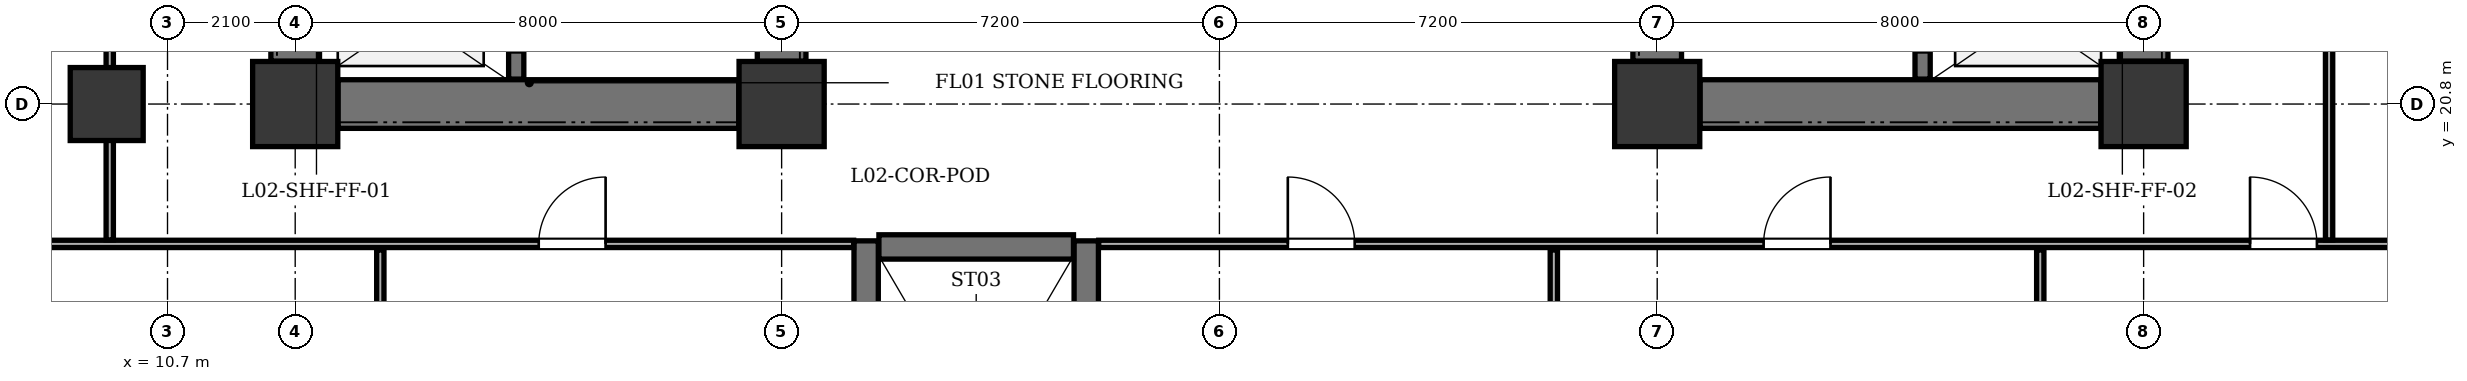
"""IFC4 building model, lengths in metres.
Left out: names, types, materials, properties, quantities, classifications, styles, units other than length and angle.
Written with IfcOpenShell. Run it as: python <this file> out.ifc"""

import sys

from ifc_helpers import new_model, si_unit, direction, frame, frame_2d, origin, origin_2d, place, context, subcontext, project, spatial, rectangle, extrude, element, fill, save


model = new_model("IFC4")
c1 = context("Model", 3, precision=1e-05, world=origin(), true_north=direction((0.0, 1.0)))
c2 = subcontext(c1, "Body", "Model", "MODEL_VIEW")
j1 = project(units=[si_unit("LENGTHUNIT", "METRE"), si_unit("PLANEANGLEUNIT", "RADIAN")], contexts=[c1])
p1 = place(None, origin())
s1 = spatial("IfcSite", under=j1, at=p1, CompositionType="ELEMENT")
p2 = place(p1, origin())
s2 = spatial("IfcBuilding", under=s1, at=p2, CompositionType="ELEMENT")
p3 = place(p2, frame((0.0, 0.0, 9.9)))
s3 = spatial("IfcBuildingStorey", under=s2, at=p3, CompositionType="ELEMENT", Elevation=9.9)
for number, where, z_axis, x_axis in (
    (1, (12.8, 20.8, 0.0), (0.0, 0.0, 1.0), (1.0, 0.0, 0.0)),
    (2, (20.8, 20.8, 0.0), (0.0, 0.0, 1.0), (1.0, 0.0, 0.0)),
    (3, (35.2, 20.8, 0.0), (0.0, 0.0, 1.0), (1.0, 0.0, 0.0)),
    (4, (43.2, 20.8, 0.0), (0.0, 0.0, 1.0), (1.0, 0.0, 0.0)),
):
    element("IfcColumn", number, at=place(p3, frame(where, z_axis=z_axis, x_axis=x_axis)), inside=s3, PredefinedType="COLUMN", context=c2, shape_type="SweptSolid", body=[
        extrude(rectangle(XDim=1.4, YDim=1.4, at=origin_2d()), origin(), (0.0, 0.0, 1.0), 4.5),
    ])
p4 = place(p3, frame((9.7, 20.8, 0.0), z_axis=(0.0, 0.0, 1.0), x_axis=(1.0, 0.0, 0.0)))
e5 = element("IfcColumn", 5, at=p4, inside=s3, PredefinedType="COLUMN", context=c2, shape_type="SweptSolid", body=[
    extrude(rectangle(XDim=1.2, YDim=1.2, at=origin_2d()), origin(), (0.0, 0.0, 1.0), 4.5),
])
p5 = place(p3, frame((12.8, 21.505, 0.0), z_axis=(0.0, 0.0, 1.0), x_axis=(0.0, 1.0, 0.0)))
e6 = element("IfcWall", 6, at=p5, inside=s3, PredefinedType="SHEAR", context=c2, shape_type="SweptSolid", body=[
    extrude(rectangle(XDim=11.39, YDim=0.8, at=frame_2d((5.695, 0.0))), origin(), (0.0, 0.0, 1.0), 4.18),
])
p6 = place(p3, frame((13.505, 20.8, 0.0), z_axis=(0.0, 0.0, 1.0), x_axis=(1.0, 0.0, 0.0)))
e7 = element("IfcWall", 7, at=p6, inside=s3, PredefinedType="SHEAR", context=c2, shape_type="SweptSolid", body=[
    extrude(rectangle(XDim=6.59, YDim=0.8, at=frame_2d((3.295, 0.0))), origin(), (0.0, 0.0, 1.0), 4.18),
])
p7 = place(p3, frame((20.8, 21.505, 0.0), z_axis=(0.0, 0.0, 1.0), x_axis=(0.0, 1.0, 0.0)))
e8 = element("IfcWall", 8, at=p7, inside=s3, PredefinedType="SHEAR", context=c2, shape_type="SweptSolid", body=[
    extrude(rectangle(XDim=11.39, YDim=0.8, at=frame_2d((5.695, 0.0))), origin(), (0.0, 0.0, 1.0), 4.18),
])
p8 = place(p7, frame((1.095, 0.0, 0.0)))
e9 = element("IfcOpeningElement", 9, at=p8, cuts=e8, PredefinedType="OPENING", context=c2, shape_type="SweptSolid", body=[
    extrude(rectangle(XDim=1.2, YDim=2.15, at=frame_2d((0.6, 1.075))), frame((0.0, 0.41, 0.0), z_axis=(0.0, -1.0, 0.0), x_axis=(1.0, 0.0, 0.0)), (0.0, 0.0, 1.0), 0.82),
])
p9 = place(p7, frame((4.095, 0.0, 0.0)))
e10 = element("IfcOpeningElement", 10, at=p9, cuts=e8, PredefinedType="OPENING", context=c2, shape_type="SweptSolid", body=[
    extrude(rectangle(XDim=1.1, YDim=2.1, at=frame_2d((0.55, 1.05))), frame((0.0, 0.41, 0.0), z_axis=(0.0, -1.0, 0.0), x_axis=(1.0, 0.0, 0.0)), (0.0, 0.0, 1.0), 0.82),
])
p10 = place(p7, frame((6.045, 0.0, 0.0)))
e11 = element("IfcOpeningElement", 11, at=p10, cuts=e8, PredefinedType="OPENING", context=c2, shape_type="SweptSolid", body=[
    extrude(rectangle(XDim=1.1, YDim=2.1, at=frame_2d((0.55, 1.05))), frame((0.0, 0.41, 0.0), z_axis=(0.0, -1.0, 0.0), x_axis=(1.0, 0.0, 0.0)), (0.0, 0.0, 1.0), 0.82),
])
p11 = place(p7, frame((7.995, 0.0, 0.0)))
e12 = element("IfcOpeningElement", 12, at=p11, cuts=e8, PredefinedType="OPENING", context=c2, shape_type="SweptSolid", body=[
    extrude(rectangle(XDim=1.1, YDim=2.1, at=frame_2d((0.55, 1.05))), frame((0.0, 0.41, 0.0), z_axis=(0.0, -1.0, 0.0), x_axis=(1.0, 0.0, 0.0)), (0.0, 0.0, 1.0), 0.82),
])
p12 = place(p7, frame((10.195, 0.0, 0.0)))
e13 = element("IfcOpeningElement", 13, at=p12, cuts=e8, PredefinedType="OPENING", context=c2, shape_type="SweptSolid", body=[
    extrude(rectangle(XDim=1.1, YDim=2.1, at=frame_2d((0.55, 1.05))), frame((0.0, 0.41, 0.0), z_axis=(0.0, -1.0, 0.0), x_axis=(1.0, 0.0, 0.0)), (0.0, 0.0, 1.0), 0.82),
])
p13 = place(p3, frame((16.435, 21.21, 0.0), z_axis=(0.0, 0.0, 1.0), x_axis=(0.0, 1.0, 0.0)))
e14 = element("IfcWall", 14, at=p13, inside=s3, PredefinedType="SHEAR", context=c2, shape_type="SweptSolid", body=[
    extrude(rectangle(XDim=11.98, YDim=0.25, at=frame_2d((5.99, 0.0))), origin(), (0.0, 0.0, 1.0), 4.18),
])
p14 = place(p13, frame((0.44, 0.0, 0.0)))
e15 = element("IfcOpeningElement", 15, at=p14, cuts=e14, PredefinedType="OPENING", context=c2, shape_type="SweptSolid", body=[
    extrude(rectangle(XDim=1.2, YDim=2.15, at=frame_2d((0.6, 1.075))), frame((0.0, 0.135, 0.0), z_axis=(0.0, -1.0, 0.0), x_axis=(1.0, 0.0, 0.0)), (0.0, 0.0, 1.0), 0.27),
])
p15 = place(p13, frame((2.59, 0.0, 0.0)))
e16 = element("IfcOpeningElement", 16, at=p15, cuts=e14, PredefinedType="OPENING", context=c2, shape_type="SweptSolid", body=[
    extrude(rectangle(XDim=1.15, YDim=2.15, at=frame_2d((0.575, 1.075))), frame((0.0, 0.135, 0.0), z_axis=(0.0, -1.0, 0.0), x_axis=(1.0, 0.0, 0.0)), (0.0, 0.0, 1.0), 0.27),
])
p16 = place(p3, frame((43.2, 21.505, 0.0), z_axis=(0.0, 0.0, 1.0), x_axis=(0.0, 1.0, 0.0)))
e17 = element("IfcWall", 17, at=p16, inside=s3, PredefinedType="SHEAR", context=c2, shape_type="SweptSolid", body=[
    extrude(rectangle(XDim=11.39, YDim=0.8, at=frame_2d((5.695, 0.0))), origin(), (0.0, 0.0, 1.0), 4.18),
])
p17 = place(p3, frame((35.905, 20.8, 0.0), z_axis=(0.0, 0.0, 1.0), x_axis=(1.0, 0.0, 0.0)))
e18 = element("IfcWall", 18, at=p17, inside=s3, PredefinedType="SHEAR", context=c2, shape_type="SweptSolid", body=[
    extrude(rectangle(XDim=6.59, YDim=0.8, at=frame_2d((3.295, 0.0))), origin(), (0.0, 0.0, 1.0), 4.18),
])
p18 = place(p3, frame((35.2, 21.505, 0.0), z_axis=(0.0, 0.0, 1.0), x_axis=(0.0, 1.0, 0.0)))
e19 = element("IfcWall", 19, at=p18, inside=s3, PredefinedType="SHEAR", context=c2, shape_type="SweptSolid", body=[
    extrude(rectangle(XDim=11.39, YDim=0.8, at=frame_2d((5.695, 0.0))), origin(), (0.0, 0.0, 1.0), 4.18),
])
p19 = place(p18, frame((1.095, 0.0, 0.0)))
e20 = element("IfcOpeningElement", 20, at=p19, cuts=e19, PredefinedType="OPENING", context=c2, shape_type="SweptSolid", body=[
    extrude(rectangle(XDim=1.2, YDim=2.15, at=frame_2d((0.6, 1.075))), frame((0.0, 0.41, 0.0), z_axis=(0.0, -1.0, 0.0), x_axis=(1.0, 0.0, 0.0)), (0.0, 0.0, 1.0), 0.82),
])
p20 = place(p18, frame((10.195, 0.0, 0.0)))
e21 = element("IfcOpeningElement", 21, at=p20, cuts=e19, PredefinedType="OPENING", context=c2, shape_type="SweptSolid", body=[
    extrude(rectangle(XDim=1.1, YDim=2.1, at=frame_2d((0.55, 1.05))), frame((0.0, 0.41, 0.0), z_axis=(0.0, -1.0, 0.0), x_axis=(1.0, 0.0, 0.0)), (0.0, 0.0, 1.0), 0.82),
])
p21 = place(p3, frame((39.565, 21.21, 0.0), z_axis=(0.0, 0.0, 1.0), x_axis=(0.0, 1.0, 0.0)))
e22 = element("IfcWall", 22, at=p21, inside=s3, PredefinedType="SHEAR", context=c2, shape_type="SweptSolid", body=[
    extrude(rectangle(XDim=11.98, YDim=0.25, at=frame_2d((5.99, 0.0))), origin(), (0.0, 0.0, 1.0), 4.18),
])
p22 = place(p21, frame((0.44, 0.0, 0.0)))
e23 = element("IfcOpeningElement", 23, at=p22, cuts=e22, PredefinedType="OPENING", context=c2, shape_type="SweptSolid", body=[
    extrude(rectangle(XDim=1.2, YDim=2.15, at=frame_2d((0.6, 1.075))), frame((0.0, 0.135, 0.0), z_axis=(0.0, -1.0, 0.0), x_axis=(1.0, 0.0, 0.0)), (0.0, 0.0, 1.0), 0.27),
])
p23 = place(p21, frame((2.59, 0.0, 0.0)))
e24 = element("IfcOpeningElement", 24, at=p23, cuts=e22, PredefinedType="OPENING", context=c2, shape_type="SweptSolid", body=[
    extrude(rectangle(XDim=1.15, YDim=2.15, at=frame_2d((0.575, 1.075))), frame((0.0, 0.135, 0.0), z_axis=(0.0, -1.0, 0.0), x_axis=(1.0, 0.0, 0.0)), (0.0, 0.0, 1.0), 0.27),
])
p24 = place(p3, frame((22.19, 10.95, 0.0), z_axis=(0.0, 0.0, 1.0), x_axis=(0.0, 1.0, 0.0)))
e25 = element("IfcWall", 25, at=p24, inside=s3, PredefinedType="SHEAR", context=c2, shape_type="SweptSolid", body=[
    extrude(rectangle(XDim=7.6, YDim=0.4, at=frame_2d((3.8, 0.0))), origin(), (0.0, 0.0, 1.0), 4.18),
])
p25 = place(p24, frame((0.35, 0.0, 0.0)))
e26 = element("IfcOpeningElement", 26, at=p25, cuts=e25, PredefinedType="OPENING", context=c2, shape_type="SweptSolid", body=[
    extrude(rectangle(XDim=1.15, YDim=2.15, at=frame_2d((0.575, 1.075))), frame((0.0, 0.21, 0.0), z_axis=(0.0, -1.0, 0.0), x_axis=(1.0, 0.0, 0.0)), (0.0, 0.0, 1.0), 0.42),
])
p26 = place(p3, frame((25.81, 10.95, 0.0), z_axis=(0.0, 0.0, 1.0), x_axis=(0.0, 1.0, 0.0)))
e27 = element("IfcWall", 27, at=p26, inside=s3, PredefinedType="SHEAR", context=c2, shape_type="SweptSolid", body=[
    extrude(rectangle(XDim=7.6, YDim=0.4, at=frame_2d((3.8, 0.0))), origin(), (0.0, 0.0, 1.0), 4.18),
])
p27 = place(p3, frame((22.4, 18.45, 0.0), z_axis=(0.0, 0.0, 1.0), x_axis=(1.0, 0.0, 0.0)))
e28 = element("IfcWall", 28, at=p27, inside=s3, PredefinedType="SHEAR", context=c2, shape_type="SweptSolid", body=[
    extrude(rectangle(XDim=3.2, YDim=0.4, at=frame_2d((1.6, 0.0))), origin(), (0.0, 0.0, 1.0), 4.18),
])
p28 = place(p3, frame((2.805, 18.5, 0.0), z_axis=(0.0, 0.0, 1.0), x_axis=(1.0, 0.0, 0.0)))
e29 = element("IfcWall", 29, at=p28, inside=s3, PredefinedType="PARTITIONING", context=c2, shape_type="SweptSolid", body=[
    extrude(rectangle(XDim=19.18, YDim=0.12, at=frame_2d((9.59, 0.0))), origin(), (0.0, 0.0, 1.0), 3.665),
])
p29 = place(p28, frame((4.0, 0.0, 0.0)))
e30 = element("IfcOpeningElement", 30, at=p29, cuts=e29, PredefinedType="OPENING", context=c2, shape_type="SweptSolid", body=[
    extrude(rectangle(XDim=1.1, YDim=2.15, at=frame_2d((0.55, 1.075))), frame((0.0, 0.07, 0.0), z_axis=(0.0, -1.0, 0.0), x_axis=(1.0, 0.0, 0.0)), (0.0, 0.0, 1.0), 0.14),
])
p30 = place(p28, frame((14.0, 0.0, 0.0)))
e31 = element("IfcOpeningElement", 31, at=p30, cuts=e29, PredefinedType="OPENING", context=c2, shape_type="SweptSolid", body=[
    extrude(rectangle(XDim=1.1, YDim=2.15, at=frame_2d((0.55, 1.075))), frame((0.0, 0.07, 0.0), z_axis=(0.0, -1.0, 0.0), x_axis=(1.0, 0.0, 0.0)), (0.0, 0.0, 1.0), 0.14),
])
p31 = place(p3, frame((26.015, 18.5, 0.0), z_axis=(0.0, 0.0, 1.0), x_axis=(1.0, 0.0, 0.0)))
e32 = element("IfcWall", 32, at=p31, inside=s3, PredefinedType="PARTITIONING", context=c2, shape_type="SweptSolid", body=[
    extrude(rectangle(XDim=31.58, YDim=0.12, at=frame_2d((15.79, 0.0))), origin(), (0.0, 0.0, 1.0), 3.665),
])
p32 = place(p31, frame((3.11, 0.0, 0.0)))
e33 = element("IfcOpeningElement", 33, at=p32, cuts=e32, PredefinedType="OPENING", context=c2, shape_type="SweptSolid", body=[
    extrude(rectangle(XDim=1.1, YDim=2.15, at=frame_2d((0.55, 1.075))), frame((0.0, 0.07, 0.0), z_axis=(0.0, -1.0, 0.0), x_axis=(1.0, 0.0, 0.0)), (0.0, 0.0, 1.0), 0.14),
])
p33 = place(p31, frame((10.935, 0.0, 0.0)))
e34 = element("IfcOpeningElement", 34, at=p33, cuts=e32, PredefinedType="OPENING", context=c2, shape_type="SweptSolid", body=[
    extrude(rectangle(XDim=1.1, YDim=2.15, at=frame_2d((0.55, 1.075))), frame((0.0, 0.07, 0.0), z_axis=(0.0, -1.0, 0.0), x_axis=(1.0, 0.0, 0.0)), (0.0, 0.0, 1.0), 0.14),
])
p34 = place(p31, frame((18.935, 0.0, 0.0)))
e35 = element("IfcOpeningElement", 35, at=p34, cuts=e32, PredefinedType="OPENING", context=c2, shape_type="SweptSolid", body=[
    extrude(rectangle(XDim=1.1, YDim=2.15, at=frame_2d((0.55, 1.075))), frame((0.0, 0.07, 0.0), z_axis=(0.0, -1.0, 0.0), x_axis=(1.0, 0.0, 0.0)), (0.0, 0.0, 1.0), 0.14),
])
p35 = place(p31, frame((26.685, 0.0, 0.0)))
e36 = element("IfcOpeningElement", 36, at=p35, cuts=e32, PredefinedType="OPENING", context=c2, shape_type="SweptSolid", body=[
    extrude(rectangle(XDim=1.1, YDim=2.15, at=frame_2d((0.55, 1.075))), frame((0.0, 0.07, 0.0), z_axis=(0.0, -1.0, 0.0), x_axis=(1.0, 0.0, 0.0)), (0.0, 0.0, 1.0), 0.14),
])
p36 = place(p3, frame((14.2, 1.905, 0.0), z_axis=(0.0, 0.0, 1.0), x_axis=(0.0, 1.0, 0.0)))
e37 = element("IfcWall", 37, at=p36, inside=s3, PredefinedType="PARTITIONING", context=c2, shape_type="SweptSolid", body=[
    extrude(rectangle(XDim=16.495, YDim=0.12, at=frame_2d((8.248, 0.0))), origin(), (0.0, 0.0, 1.0), 4.18),
])
p37 = place(p3, frame((33.5, 1.905, 0.0), z_axis=(0.0, 0.0, 1.0), x_axis=(0.0, 1.0, 0.0)))
e38 = element("IfcWall", 38, at=p37, inside=s3, PredefinedType="PARTITIONING", context=c2, shape_type="SweptSolid", body=[
    extrude(rectangle(XDim=16.495, YDim=0.12, at=frame_2d((8.248, 0.0))), origin(), (0.0, 0.0, 1.0), 3.665),
])
p38 = place(p3, frame((41.5, 1.905, 0.0), z_axis=(0.0, 0.0, 1.0), x_axis=(0.0, 1.0, 0.0)))
e39 = element("IfcWall", 39, at=p38, inside=s3, PredefinedType="PARTITIONING", context=c2, shape_type="SweptSolid", body=[
    extrude(rectangle(XDim=16.495, YDim=0.12, at=frame_2d((8.248, 0.0))), origin(), (0.0, 0.0, 1.0), 4.18),
])
p39 = place(p3, frame((9.75, 18.565, 0.0), z_axis=(0.0, 0.0, 1.0), x_axis=(0.0, 1.0, 0.0)))
e40 = element("IfcWall", 40, at=p39, inside=s3, PredefinedType="PARTITIONING", context=c2, shape_type="SweptSolid", body=[
    extrude(rectangle(XDim=19.72, YDim=0.12, at=frame_2d((9.86, 0.0))), origin(), (0.0, 0.0, 1.0), 3.065),
])
p40 = place(p39, frame((7.985, 0.0, 0.0)))
e41 = element("IfcOpeningElement", 41, at=p40, cuts=e40, PredefinedType="OPENING", context=c2, shape_type="SweptSolid", body=[
    extrude(rectangle(XDim=1.0, YDim=2.1, at=frame_2d((0.5, 1.05))), frame((0.0, 0.07, 0.0), z_axis=(0.0, -1.0, 0.0), x_axis=(1.0, 0.0, 0.0)), (0.0, 0.0, 1.0), 0.14),
])
p41 = place(p3, frame((46.25, 18.565, 0.0), z_axis=(0.0, 0.0, 1.0), x_axis=(0.0, 1.0, 0.0)))
e42 = element("IfcWall", 42, at=p41, inside=s3, PredefinedType="PARTITIONING", context=c2, shape_type="SweptSolid", body=[
    extrude(rectangle(XDim=19.72, YDim=0.12, at=frame_2d((9.86, 0.0))), origin(), (0.0, 0.0, 1.0), 4.18),
])
p42 = place(p41, frame((7.985, 0.0, 0.0)))
e43 = element("IfcOpeningElement", 43, at=p42, cuts=e42, PredefinedType="OPENING", context=c2, shape_type="SweptSolid", body=[
    extrude(rectangle(XDim=1.0, YDim=2.1, at=frame_2d((0.5, 1.05))), frame((0.0, 0.07, 0.0), z_axis=(0.0, -1.0, 0.0), x_axis=(1.0, 0.0, 0.0)), (0.0, 0.0, 1.0), 0.14),
])
p43 = place(p30, origin())
e44 = element("IfcDoor", 44, at=p43, inside=s3, OperationType="SINGLE_SWING_RIGHT", PredefinedType="DOOR", context=c2, shape_type="SweptSolid", body=[
    extrude(rectangle(XDim=1.1, YDim=2.15, at=frame_2d((0.55, 1.075))), frame((0.0, 0.025, 0.0), z_axis=(0.0, -1.0, 0.0), x_axis=(1.0, 0.0, 0.0)), (0.0, 0.0, 1.0), 0.05),
])
fill(e31, e44)
p44 = place(p32, origin())
e45 = element("IfcDoor", 45, at=p44, inside=s3, OperationType="SINGLE_SWING_LEFT", PredefinedType="DOOR", context=c2, shape_type="SweptSolid", body=[
    extrude(rectangle(XDim=1.1, YDim=2.15, at=frame_2d((0.55, 1.075))), frame((0.0, 0.025, 0.0), z_axis=(0.0, -1.0, 0.0), x_axis=(1.0, 0.0, 0.0)), (0.0, 0.0, 1.0), 0.05),
])
fill(e33, e45)
p45 = place(p33, origin())
e46 = element("IfcDoor", 46, at=p45, inside=s3, OperationType="SINGLE_SWING_RIGHT", PredefinedType="DOOR", context=c2, shape_type="SweptSolid", body=[
    extrude(rectangle(XDim=1.1, YDim=2.15, at=frame_2d((0.55, 1.075))), frame((0.0, 0.025, 0.0), z_axis=(0.0, -1.0, 0.0), x_axis=(1.0, 0.0, 0.0)), (0.0, 0.0, 1.0), 0.05),
])
fill(e34, e46)
p46 = place(p34, origin())
e47 = element("IfcDoor", 47, at=p46, inside=s3, OperationType="SINGLE_SWING_LEFT", PredefinedType="DOOR", context=c2, shape_type="SweptSolid", body=[
    extrude(rectangle(XDim=1.1, YDim=2.15, at=frame_2d((0.55, 1.075))), frame((0.0, 0.025, 0.0), z_axis=(0.0, -1.0, 0.0), x_axis=(1.0, 0.0, 0.0)), (0.0, 0.0, 1.0), 0.05),
])
fill(e35, e47)
save(model, sys.argv[1])
